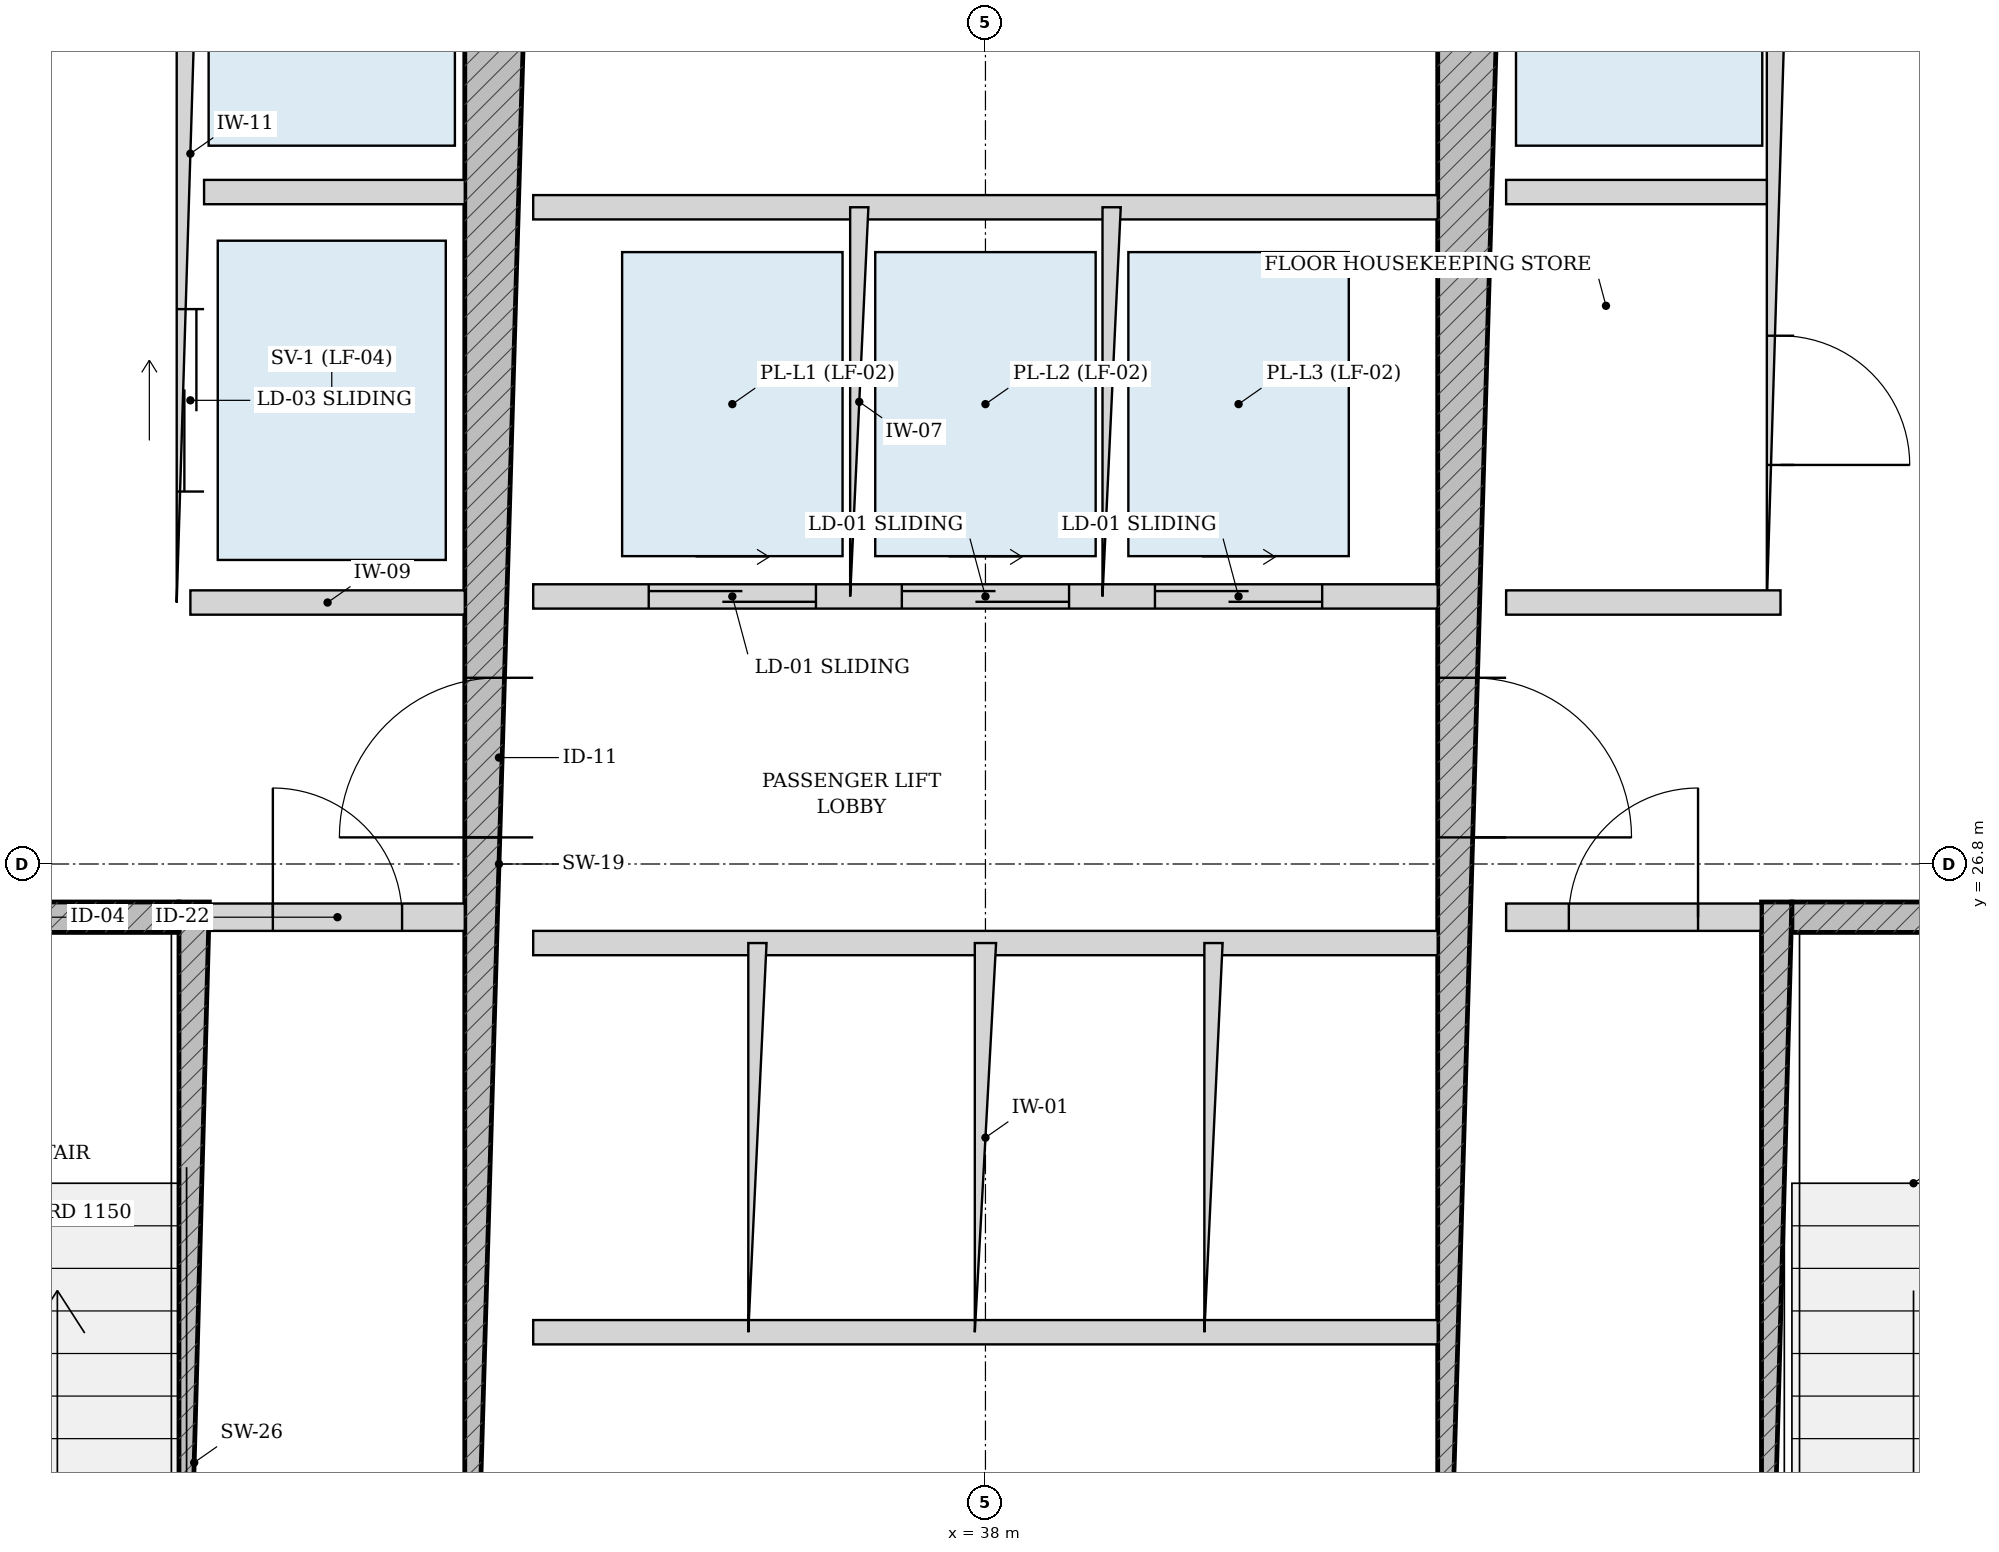
"""IFC4 building model, lengths in metres.
Left out: names, types, materials, properties, quantities, classifications, styles, units other than length and angle.
Written with IfcOpenShell. Run it as: python <this file> out.ifc"""

import sys

from ifc_helpers import new_model, si_unit, direction, frame, frame_2d, origin, place, context, subcontext, project, spatial, rectangle, extrude, source, transform, mapped, element, fill, save


model = new_model("IFC4")
c1 = context("Model", 3, precision=1e-05, world=origin(), true_north=direction((-0.2419218956, 0.970295726276)))
c2 = subcontext(c1, "Body", "Model", "MODEL_VIEW")
j1 = project(units=[si_unit("LENGTHUNIT", "METRE"), si_unit("PLANEANGLEUNIT", "RADIAN")], contexts=[c1])
p1 = place(None, origin())
s1 = spatial("IfcSite", under=j1, at=p1, CompositionType="ELEMENT")
p2 = place(p1, origin())
s2 = spatial("IfcBuilding", under=s1, at=p2, CompositionType="ELEMENT")
p3 = place(p2, frame((0.0, 0.0, 74.4)))
s3 = spatial("IfcBuildingStorey", under=s2, at=p3, CompositionType="ELEMENT", Elevation=74.4)
p4 = place(p3, frame((32.795, 19.175, 0.0), z_axis=(0.0, 0.0, 1.0), x_axis=(0.0, 1.0, 0.0)))
e1 = element("IfcWall", 1, at=p4, inside=s3, PredefinedType="SOLIDWALL", context=c2, shape_type="SweptSolid", body=[
    extrude(rectangle(XDim=7.375, YDim=0.2, at=frame_2d((3.688, 0.0))), origin(), (0.0, 0.0, 1.0), 5.125),
])
p5 = place(p3, frame((29.375, 26.45, 0.0), z_axis=(0.0, 0.0, 1.0), x_axis=(1.0, 0.0, 0.0)))
e2 = element("IfcWall", 2, at=p5, inside=s3, PredefinedType="SOLIDWALL", context=c2, shape_type="SweptSolid", body=[
    extrude(rectangle(XDim=3.32, YDim=0.2, at=frame_2d((1.66, 0.0))), origin(), (0.0, 0.0, 1.0), 5.125),
])
p6 = place(p5, frame((1.185, 0.0, 0.0)))
e3 = element("IfcOpeningElement", 3, at=p6, cuts=e2, PredefinedType="OPENING", context=c2, shape_type="SweptSolid", body=[
    extrude(rectangle(XDim=0.95, YDim=2.15, at=frame_2d((0.475, 1.075))), frame((0.0, 0.11, 0.0), z_axis=(0.0, -1.0, 0.0), x_axis=(1.0, 0.0, 0.0)), (0.0, 0.0, 1.0), 0.22),
])
p7 = place(p3, frame((43.205, 19.175, 0.0), z_axis=(0.0, 0.0, 1.0), x_axis=(0.0, 1.0, 0.0)))
e4 = element("IfcWall", 4, at=p7, inside=s3, PredefinedType="SOLIDWALL", context=c2, shape_type="SweptSolid", body=[
    extrude(rectangle(XDim=7.375, YDim=0.2, at=frame_2d((3.688, 0.0))), origin(), (0.0, 0.0, 1.0), 5.125),
])
p8 = place(p3, frame((43.305, 26.45, 0.0), z_axis=(0.0, 0.0, 1.0), x_axis=(1.0, 0.0, 0.0)))
e5 = element("IfcWall", 5, at=p8, inside=s3, PredefinedType="SOLIDWALL", context=c2, shape_type="SweptSolid", body=[
    extrude(rectangle(XDim=3.32, YDim=0.2, at=frame_2d((1.66, 0.0))), origin(), (0.0, 0.0, 1.0), 5.125),
])
p9 = place(p8, frame((1.185, 0.0, 0.0)))
e6 = element("IfcOpeningElement", 6, at=p9, cuts=e5, PredefinedType="OPENING", context=c2, shape_type="SweptSolid", body=[
    extrude(rectangle(XDim=0.95, YDim=2.15, at=frame_2d((0.475, 1.075))), frame((0.0, 0.11, 0.0), z_axis=(0.0, -1.0, 0.0), x_axis=(1.0, 0.0, 0.0)), (0.0, 0.0, 1.0), 0.22),
])
p10 = place(p3, frame((34.8, 19.175, 0.0), z_axis=(0.0, 0.0, 1.0), x_axis=(0.0, 1.0, 0.0)))
e7 = element("IfcWall", 7, at=p10, inside=s3, PredefinedType="SHEAR", context=c2, shape_type="SweptSolid", body=[
    extrude(rectangle(XDim=15.25, YDim=0.45, at=frame_2d((7.625, 0.0))), origin(), (0.0, 0.0, 1.0), 5.125),
])
p11 = place(p10, frame((7.8, 0.0, 0.0)))
e8 = element("IfcOpeningElement", 8, at=p11, cuts=e7, PredefinedType="OPENING", context=c2, shape_type="SweptSolid", body=[
    extrude(rectangle(XDim=1.05, YDim=2.15, at=frame_2d((0.525, 1.075))), frame((0.0, 0.235, 0.0), z_axis=(0.0, -1.0, 0.0), x_axis=(1.0, 0.0, 0.0)), (0.0, 0.0, 1.0), 0.47),
])
p12 = place(p3, frame((41.2, 19.175, 0.0), z_axis=(0.0, 0.0, 1.0), x_axis=(0.0, 1.0, 0.0)))
e9 = element("IfcWall", 9, at=p12, inside=s3, PredefinedType="SHEAR", context=c2, shape_type="SweptSolid", body=[
    extrude(rectangle(XDim=15.25, YDim=0.45, at=frame_2d((7.625, 0.0))), origin(), (0.0, 0.0, 1.0), 5.125),
])
p13 = place(p12, frame((7.8, 0.0, 0.0)))
e10 = element("IfcOpeningElement", 10, at=p13, cuts=e9, PredefinedType="OPENING", context=c2, shape_type="SweptSolid", body=[
    extrude(rectangle(XDim=1.05, YDim=2.15, at=frame_2d((0.525, 1.075))), frame((0.0, 0.235, 0.0), z_axis=(0.0, -1.0, 0.0), x_axis=(1.0, 0.0, 0.0)), (0.0, 0.0, 1.0), 0.47),
])
p14 = place(p3, frame((32.9, 26.45, 0.0), z_axis=(0.0, 0.0, 1.0), x_axis=(1.0, 0.0, 0.0)))
e11 = element("IfcWall", 11, at=p14, inside=s3, PredefinedType="PARTITIONING", context=c2, shape_type="SweptSolid", body=[
    extrude(rectangle(XDim=1.675, YDim=0.18, at=frame_2d((0.837, 0.0))), origin(), (0.0, 0.0, 1.0), 5.125),
])
p15 = place(p14, frame((0.413, 0.0, 0.0)))
e12 = element("IfcOpeningElement", 12, at=p15, cuts=e11, PredefinedType="OPENING", context=c2, shape_type="SweptSolid", body=[
    extrude(rectangle(XDim=0.85, YDim=2.1, at=frame_2d((0.425, 1.05))), frame((0.0, 0.1, 0.0), z_axis=(0.0, -1.0, 0.0), x_axis=(1.0, 0.0, 0.0)), (0.0, 0.0, 1.0), 0.2),
])
p16 = place(p3, frame((41.425, 26.45, 0.0), z_axis=(0.0, 0.0, 1.0), x_axis=(1.0, 0.0, 0.0)))
e13 = element("IfcWall", 13, at=p16, inside=s3, PredefinedType="PARTITIONING", context=c2, shape_type="SweptSolid", body=[
    extrude(rectangle(XDim=1.675, YDim=0.18, at=frame_2d((0.837, 0.0))), origin(), (0.0, 0.0, 1.0), 5.125),
])
p17 = place(p16, frame((0.413, 0.0, 0.0)))
e14 = element("IfcOpeningElement", 14, at=p17, cuts=e13, PredefinedType="OPENING", context=c2, shape_type="SweptSolid", body=[
    extrude(rectangle(XDim=0.85, YDim=2.1, at=frame_2d((0.425, 1.05))), frame((0.0, 0.1, 0.0), z_axis=(0.0, -1.0, 0.0), x_axis=(1.0, 0.0, 0.0)), (0.0, 0.0, 1.0), 0.2),
])
p18 = place(p3, frame((32.77, 28.52, 0.0), z_axis=(0.0, 0.0, 1.0), x_axis=(0.0, 1.0, 0.0)))
e15 = element("IfcWall", 15, at=p18, inside=s3, PredefinedType="PARTITIONING", context=c2, shape_type="SweptSolid", body=[
    extrude(rectangle(XDim=5.905, YDim=0.18, at=frame_2d((2.953, 0.0))), origin(), (0.0, 0.0, 1.0), 5.125),
])
p19 = place(p18, frame((3.655, 0.0, 0.0)))
e16 = element("IfcOpeningElement", 16, at=p19, cuts=e15, PredefinedType="OPENING", context=c2, shape_type="SweptSolid", body=[
    extrude(rectangle(XDim=1.15, YDim=2.2, at=frame_2d((0.575, 1.1))), frame((0.0, 0.1, 0.0), z_axis=(0.0, -1.0, 0.0), x_axis=(1.0, 0.0, 0.0)), (0.0, 0.0, 1.0), 0.2),
])
p20 = place(p18, frame((0.73, 0.0, 0.0)))
e17 = element("IfcOpeningElement", 17, at=p20, cuts=e15, PredefinedType="OPENING", context=c2, shape_type="SweptSolid", body=[
    extrude(rectangle(XDim=1.2, YDim=2.25, at=frame_2d((0.6, 1.125))), frame((0.0, 0.1, 0.0), z_axis=(0.0, -1.0, 0.0), x_axis=(1.0, 0.0, 0.0)), (0.0, 0.0, 1.0), 0.2),
])
p21 = place(p3, frame((32.86, 31.22, 0.0), z_axis=(0.0, 0.0, 1.0), x_axis=(1.0, 0.0, 0.0)))
e18 = element("IfcWall", 18, at=p21, inside=s3, PredefinedType="PARTITIONING", context=c2, shape_type="SweptSolid", body=[
    extrude(rectangle(XDim=1.715, YDim=0.16, at=frame_2d((0.857, 0.0))), origin(), (0.0, 0.0, 1.0), 5.125),
])
p22 = place(p3, frame((32.77, 28.52, 0.0), z_axis=(0.0, 0.0, 1.0), x_axis=(1.0, 0.0, 0.0)))
e19 = element("IfcWall", 19, at=p22, inside=s3, PredefinedType="PARTITIONING", context=c2, shape_type="SweptSolid", body=[
    extrude(rectangle(XDim=1.805, YDim=0.16, at=frame_2d((0.902, 0.0))), origin(), (0.0, 0.0, 1.0), 5.125),
])
p23 = place(p3, frame((43.23, 28.52, 0.0), z_axis=(0.0, 0.0, 1.0), x_axis=(0.0, 1.0, 0.0)))
e20 = element("IfcWall", 20, at=p23, inside=s3, PredefinedType="PARTITIONING", context=c2, shape_type="SweptSolid", body=[
    extrude(rectangle(XDim=5.905, YDim=0.18, at=frame_2d((2.953, 0.0))), origin(), (0.0, 0.0, 1.0), 5.125),
])
p24 = place(p23, frame((0.905, 0.0, 0.0)))
e21 = element("IfcOpeningElement", 21, at=p24, cuts=e20, PredefinedType="OPENING", context=c2, shape_type="SweptSolid", body=[
    extrude(rectangle(XDim=0.85, YDim=2.1, at=frame_2d((0.425, 1.05))), frame((0.0, 0.1, 0.0), z_axis=(0.0, -1.0, 0.0), x_axis=(1.0, 0.0, 0.0)), (0.0, 0.0, 1.0), 0.2),
])
p25 = place(p23, frame((3.655, 0.0, 0.0)))
e22 = element("IfcOpeningElement", 22, at=p25, cuts=e20, PredefinedType="OPENING", context=c2, shape_type="SweptSolid", body=[
    extrude(rectangle(XDim=1.15, YDim=2.2, at=frame_2d((0.575, 1.1))), frame((0.0, 0.1, 0.0), z_axis=(0.0, -1.0, 0.0), x_axis=(1.0, 0.0, 0.0)), (0.0, 0.0, 1.0), 0.2),
])
p26 = place(p3, frame((41.425, 31.22, 0.0), z_axis=(0.0, 0.0, 1.0), x_axis=(1.0, 0.0, 0.0)))
e23 = element("IfcWall", 23, at=p26, inside=s3, PredefinedType="PARTITIONING", context=c2, shape_type="SweptSolid", body=[
    extrude(rectangle(XDim=1.715, YDim=0.16, at=frame_2d((0.857, 0.0))), origin(), (0.0, 0.0, 1.0), 5.125),
])
p27 = place(p3, frame((41.425, 28.52, 0.0), z_axis=(0.0, 0.0, 1.0), x_axis=(1.0, 0.0, 0.0)))
e24 = element("IfcWall", 24, at=p27, inside=s3, PredefinedType="PARTITIONING", context=c2, shape_type="SweptSolid", body=[
    extrude(rectangle(XDim=1.805, YDim=0.16, at=frame_2d((0.902, 0.0))), origin(), (0.0, 0.0, 1.0), 5.125),
])
p28 = place(p3, frame((35.025, 28.56, 0.0), z_axis=(0.0, 0.0, 1.0), x_axis=(1.0, 0.0, 0.0)))
e25 = element("IfcWall", 25, at=p28, inside=s3, PredefinedType="PARTITIONING", context=c2, shape_type="SweptSolid", body=[
    extrude(rectangle(XDim=5.95, YDim=0.16, at=frame_2d((2.975, 0.0))), origin(), (0.0, 0.0, 1.0), 5.125),
])
p29 = place(p28, frame((0.76, 0.0, 0.0)))
e26 = element("IfcOpeningElement", 26, at=p29, cuts=e25, PredefinedType="OPENING", context=c2, shape_type="SweptSolid", body=[
    extrude(rectangle(XDim=1.1, YDim=2.2, at=frame_2d((0.55, 1.1))), frame((0.0, 0.09, 0.0), z_axis=(0.0, -1.0, 0.0), x_axis=(1.0, 0.0, 0.0)), (0.0, 0.0, 1.0), 0.18),
])
p30 = place(p28, frame((2.425, 0.0, 0.0)))
e27 = element("IfcOpeningElement", 27, at=p30, cuts=e25, PredefinedType="OPENING", context=c2, shape_type="SweptSolid", body=[
    extrude(rectangle(XDim=1.1, YDim=2.2, at=frame_2d((0.55, 1.1))), frame((0.0, 0.09, 0.0), z_axis=(0.0, -1.0, 0.0), x_axis=(1.0, 0.0, 0.0)), (0.0, 0.0, 1.0), 0.18),
])
p31 = place(p28, frame((4.09, 0.0, 0.0)))
e28 = element("IfcOpeningElement", 28, at=p31, cuts=e25, PredefinedType="OPENING", context=c2, shape_type="SweptSolid", body=[
    extrude(rectangle(XDim=1.1, YDim=2.2, at=frame_2d((0.55, 1.1))), frame((0.0, 0.09, 0.0), z_axis=(0.0, -1.0, 0.0), x_axis=(1.0, 0.0, 0.0)), (0.0, 0.0, 1.0), 0.18),
])
p32 = place(p3, frame((35.025, 31.12, 0.0), z_axis=(0.0, 0.0, 1.0), x_axis=(1.0, 0.0, 0.0)))
e29 = element("IfcWall", 29, at=p32, inside=s3, PredefinedType="PARTITIONING", context=c2, shape_type="SweptSolid", body=[
    extrude(rectangle(XDim=5.95, YDim=0.16, at=frame_2d((2.975, 0.0))), origin(), (0.0, 0.0, 1.0), 5.125),
])
for number, where, z_axis, x_axis in (
    (30, (37.17, 28.56, 0.0), (0.0, 0.0, 1.0), (0.0, 1.0, 0.0)),
    (31, (38.83, 28.56, 0.0), (0.0, 0.0, 1.0), (0.0, 1.0, 0.0)),
):
    element("IfcWall", number, at=place(p3, frame(where, z_axis=z_axis, x_axis=x_axis)), inside=s3, PredefinedType="PARTITIONING", context=c2, shape_type="SweptSolid", body=[
        extrude(rectangle(XDim=2.56, YDim=0.12, at=frame_2d((1.28, 0.0))), origin(), (0.0, 0.0, 1.0), 5.125),
    ])
for number, where, z_axis, x_axis in (
    (32, (35.025, 26.28, 0.0), (0.0, 0.0, 1.0), (1.0, 0.0, 0.0)),
    (33, (35.025, 23.72, 0.0), (0.0, 0.0, 1.0), (1.0, 0.0, 0.0)),
):
    element("IfcWall", number, at=place(p3, frame(where, z_axis=z_axis, x_axis=x_axis)), inside=s3, PredefinedType="PARTITIONING", context=c2, shape_type="SweptSolid", body=[
        extrude(rectangle(XDim=5.95, YDim=0.16, at=frame_2d((2.975, 0.0))), origin(), (0.0, 0.0, 1.0), 5.125),
    ])
p33 = place(p3, frame((36.5, 23.72, 0.0), z_axis=(0.0, 0.0, 1.0), x_axis=(0.0, 1.0, 0.0)))
e34 = element("IfcWall", 34, at=p33, inside=s3, PredefinedType="PARTITIONING", context=c2, shape_type="SweptSolid", body=[
    extrude(rectangle(XDim=2.56, YDim=0.12, at=frame_2d((1.28, 0.0))), origin(), (0.0, 0.0, 1.0), 5.125),
])
p34 = place(p3, frame((38.0, 23.72, 0.0), z_axis=(0.0, 0.0, 1.0), x_axis=(0.0, 1.0, 0.0)))
e35 = element("IfcWall", 35, at=p34, inside=s3, PredefinedType="PARTITIONING", context=c2, shape_type="SweptSolid", body=[
    extrude(rectangle(XDim=2.56, YDim=0.14, at=frame_2d((1.28, 0.0))), origin(), (0.0, 0.0, 1.0), 5.125),
])
p35 = place(p3, frame((39.5, 23.72, 0.0), z_axis=(0.0, 0.0, 1.0), x_axis=(0.0, 1.0, 0.0)))
e36 = element("IfcWall", 36, at=p35, inside=s3, PredefinedType="PARTITIONING", context=c2, shape_type="SweptSolid", body=[
    extrude(rectangle(XDim=2.56, YDim=0.12, at=frame_2d((1.28, 0.0))), origin(), (0.0, 0.0, 1.0), 5.125),
])
m1 = source(origin(), c2, "Body", "SweptSolid", [
    extrude(rectangle(XDim=1.05, YDim=2.15, at=frame_2d((0.525, 1.075))), frame((0.0, 0.025, 0.0), z_axis=(0.0, -1.0, 0.0), x_axis=(1.0, 0.0, 0.0)), (0.0, 0.0, 1.0), 0.05),
])
p36 = place(p11, origin())
e37 = element("IfcDoor", 37, at=p36, inside=s3, OperationType="SINGLE_SWING_LEFT", PredefinedType="DOOR", context=c2, shape_type="MappedRepresentation", body=[
    mapped(m1, transform((0.0, 0.0, 0.0), scale=1.0)),
])
fill(e8, e37)
p37 = place(p13, frame((1.05, 0.0, 0.0), z_axis=(0.0, 0.0, 1.0), x_axis=(-1.0, 0.0, 0.0)))
e38 = element("IfcDoor", 38, at=p37, inside=s3, OperationType="SINGLE_SWING_RIGHT", PredefinedType="DOOR", context=c2, shape_type="MappedRepresentation", body=[
    mapped(m1, transform((0.0, 0.0, 0.0), scale=1.0)),
])
fill(e10, e38)
m2 = source(origin(), c2, "Body", "SweptSolid", [
    extrude(rectangle(XDim=0.85, YDim=2.1, at=frame_2d((0.425, 1.05))), frame((0.0, 0.025, 0.0), z_axis=(0.0, -1.0, 0.0), x_axis=(1.0, 0.0, 0.0)), (0.0, 0.0, 1.0), 0.05),
])
p38 = place(p15, origin())
e39 = element("IfcDoor", 39, at=p38, inside=s3, OperationType="SINGLE_SWING_LEFT", PredefinedType="DOOR", context=c2, shape_type="MappedRepresentation", body=[
    mapped(m2, transform((0.0, 0.0, 0.0), scale=1.0)),
])
fill(e12, e39)
p39 = place(p17, origin())
e40 = element("IfcDoor", 40, at=p39, inside=s3, OperationType="SINGLE_SWING_RIGHT", PredefinedType="DOOR", context=c2, shape_type="MappedRepresentation", body=[
    mapped(m2, transform((0.0, 0.0, 0.0), scale=1.0)),
])
fill(e14, e40)
p40 = place(p24, frame((0.85, 0.0, 0.0), z_axis=(0.0, 0.0, 1.0), x_axis=(-1.0, 0.0, 0.0)))
e41 = element("IfcDoor", 41, at=p40, inside=s3, OperationType="SINGLE_SWING_RIGHT", PredefinedType="DOOR", context=c2, shape_type="MappedRepresentation", body=[
    mapped(m2, transform((0.0, 0.0, 0.0), scale=1.0)),
])
fill(e21, e41)
m3 = source(origin(), c2, "Body", "SweptSolid", [
    extrude(rectangle(XDim=1.2, YDim=2.25, at=frame_2d((0.6, 1.125))), frame((0.0, 0.025, 0.0), z_axis=(0.0, -1.0, 0.0), x_axis=(1.0, 0.0, 0.0)), (0.0, 0.0, 1.0), 0.05),
])
p41 = place(p20, origin())
e42 = element("IfcDoor", 42, at=p41, inside=s3, OperationType="DOUBLE_DOOR_SLIDING", PredefinedType="DOOR", context=c2, shape_type="MappedRepresentation", body=[
    mapped(m3, transform((0.0, 0.0, 0.0), scale=1.0)),
])
fill(e17, e42)
m4 = source(origin(), c2, "Body", "SweptSolid", [
    extrude(rectangle(XDim=1.1, YDim=2.2, at=frame_2d((0.55, 1.1))), frame((0.0, 0.025, 0.0), z_axis=(0.0, -1.0, 0.0), x_axis=(1.0, 0.0, 0.0)), (0.0, 0.0, 1.0), 0.05),
])
p42 = place(p29, origin())
e43 = element("IfcDoor", 43, at=p42, inside=s3, OperationType="DOUBLE_DOOR_SLIDING", PredefinedType="DOOR", context=c2, shape_type="MappedRepresentation", body=[
    mapped(m4, transform((0.0, 0.0, 0.0), scale=1.0)),
])
fill(e26, e43)
p43 = place(p30, origin())
e44 = element("IfcDoor", 44, at=p43, inside=s3, OperationType="DOUBLE_DOOR_SLIDING", PredefinedType="DOOR", context=c2, shape_type="MappedRepresentation", body=[
    mapped(m4, transform((0.0, 0.0, 0.0), scale=1.0)),
])
fill(e27, e44)
p44 = place(p31, origin())
e45 = element("IfcDoor", 45, at=p44, inside=s3, OperationType="DOUBLE_DOOR_SLIDING", PredefinedType="DOOR", context=c2, shape_type="MappedRepresentation", body=[
    mapped(m4, transform((0.0, 0.0, 0.0), scale=1.0)),
])
fill(e28, e45)
save(model, sys.argv[1])
